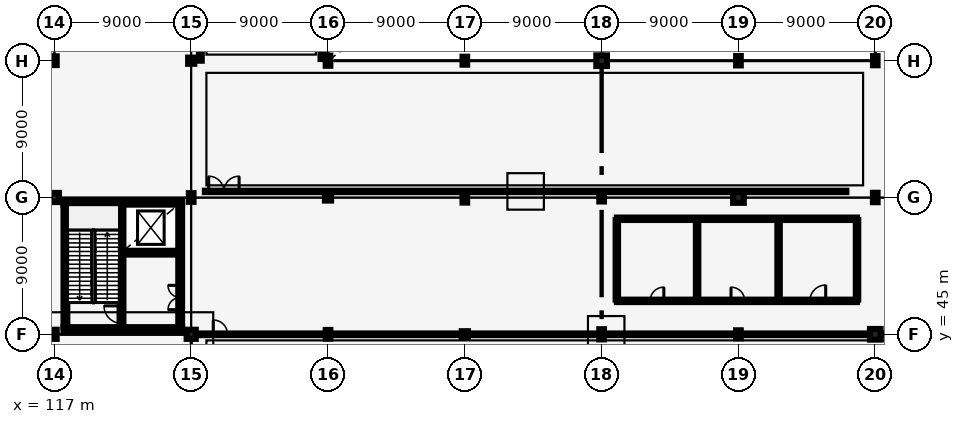
"""IFC4 building model, lengths in metres.
Left out: names, types, materials, properties, quantities, classifications, styles, units other than length and angle.
Written with IfcOpenShell. Run it as: python <this file> out.ifc"""

import sys

from ifc_helpers import new_model, si_unit, direction, frame, frame_2d, origin, origin_2d, place, context, subcontext, project, spatial, rectangle, hollow_circle, i_section, extrude, element, fill, save


model = new_model("IFC4")
c1 = context("Model", 3, precision=1e-05, world=origin(), true_north=direction((0.0, 1.0)))
c2 = subcontext(c1, "Body", "Model", "MODEL_VIEW")
j1 = project(units=[si_unit("LENGTHUNIT", "METRE"), si_unit("PLANEANGLEUNIT", "RADIAN")], contexts=[c1])
p1 = place(None, origin())
s1 = spatial("IfcSite", under=j1, at=p1, CompositionType="ELEMENT")
p2 = place(p1, origin())
s2 = spatial("IfcBuilding", under=s1, at=p2, CompositionType="ELEMENT")
p3 = place(p2, frame((0.0, 0.0, 6.0)))
s3 = spatial("IfcBuildingStorey", under=s2, at=p3, CompositionType="ELEMENT", Elevation=6.0)
p4 = place(p3, frame((117.0, 45.0, 0.0), z_axis=(0.0, 0.0, 1.0), x_axis=(1.0, 0.0, 0.0)))
e1 = element("IfcColumn", 1, at=p4, inside=s3, PredefinedType="COLUMN", context=c2, shape_type="SweptSolid", body=[
    extrude(i_section(OverallWidth=0.3, OverallDepth=0.6, WebThickness=0.015, FlangeThickness=0.03, FilletRadius=0.027, at=origin_2d()), origin(), (0.0, 0.0, 1.0), 6.0),
])
p5 = place(p3, frame((117.0, 54.0, 0.0), z_axis=(0.0, 0.0, 1.0), x_axis=(1.0, 0.0, 0.0)))
e2 = element("IfcColumn", 2, at=p5, inside=s3, PredefinedType="COLUMN", context=c2, shape_type="SweptSolid", body=[
    extrude(rectangle(XDim=0.6, YDim=0.6, at=origin_2d()), origin(), (0.0, 0.0, 1.0), 6.0),
])
p6 = place(p3, frame((117.0, 63.0, 0.0), z_axis=(0.0, 0.0, 1.0), x_axis=(1.0, 0.0, 0.0)))
e3 = element("IfcColumn", 3, at=p6, inside=s3, PredefinedType="COLUMN", context=c2, shape_type="SweptSolid", body=[
    extrude(i_section(OverallWidth=0.306, OverallDepth=0.572, WebThickness=0.021, FlangeThickness=0.04, FilletRadius=0.027, at=origin_2d()), origin(), (0.0, 0.0, 1.0), 6.0),
])
p7 = place(p3, frame((126.0, 45.0, 0.0), z_axis=(0.0, 0.0, 1.0), x_axis=(1.0, 0.0, 0.0)))
e4 = element("IfcColumn", 4, at=p7, inside=s3, PredefinedType="COLUMN", context=c2, shape_type="SweptSolid", body=[
    extrude(rectangle(XDim=0.6, YDim=0.6, at=origin_2d()), origin(), (0.0, 0.0, 1.0), 6.0),
])
p8 = place(p3, frame((126.0, 54.0, 0.0), z_axis=(0.0, 0.0, 1.0), x_axis=(1.0, 0.0, 0.0)))
e5 = element("IfcColumn", 5, at=p8, inside=s3, PredefinedType="COLUMN", context=c2, shape_type="SweptSolid", body=[
    extrude(i_section(OverallWidth=0.306, OverallDepth=0.572, WebThickness=0.021, FlangeThickness=0.04, FilletRadius=0.027, at=origin_2d()), origin(), (0.0, 0.0, 1.0), 6.0),
])
p9 = place(p3, frame((126.0, 63.0, 0.0), z_axis=(0.0, 0.0, 1.0), x_axis=(1.0, 0.0, 0.0)))
e6 = element("IfcColumn", 6, at=p9, inside=s3, PredefinedType="COLUMN", context=c2, shape_type="SweptSolid", body=[
    extrude(hollow_circle(Radius=0.203, WallThickness=0.016, at=origin_2d()), origin(), (0.0, 0.0, 1.0), 6.0),
])
p10 = place(p3, frame((135.0, 45.0, 0.0), z_axis=(0.0, 0.0, 1.0), x_axis=(1.0, 0.0, 0.0)))
e7 = element("IfcColumn", 7, at=p10, inside=s3, PredefinedType="COLUMN", context=c2, shape_type="SweptSolid", body=[
    extrude(i_section(OverallWidth=0.306, OverallDepth=0.572, WebThickness=0.021, FlangeThickness=0.04, FilletRadius=0.027, at=origin_2d()), origin(), (0.0, 0.0, 1.0), 6.0),
])
p11 = place(p3, frame((135.0, 54.0, 0.0), z_axis=(0.0, 0.0, 1.0), x_axis=(1.0, 0.0, 0.0)))
e8 = element("IfcColumn", 8, at=p11, inside=s3, PredefinedType="COLUMN", context=c2, shape_type="SweptSolid", body=[
    extrude(hollow_circle(Radius=0.203, WallThickness=0.016, at=origin_2d()), origin(), (0.0, 0.0, 1.0), 6.0),
])
p12 = place(p3, frame((135.0, 63.0, 0.0), z_axis=(0.0, 0.0, 1.0), x_axis=(1.0, 0.0, 0.0)))
e9 = element("IfcColumn", 9, at=p12, inside=s3, PredefinedType="COLUMN", context=c2, shape_type="SweptSolid", body=[
    extrude(i_section(OverallWidth=0.305, OverallDepth=0.668, WebThickness=0.021, FlangeThickness=0.04, FilletRadius=0.027, at=origin_2d()), origin(), (0.0, 0.0, 1.0), 6.0),
])
p13 = place(p3, frame((144.0, 45.0, 0.0), z_axis=(0.0, 0.0, 1.0), x_axis=(1.0, 0.0, 0.0)))
e10 = element("IfcColumn", 10, at=p13, inside=s3, PredefinedType="COLUMN", context=c2, shape_type="SweptSolid", body=[
    extrude(hollow_circle(Radius=0.203, WallThickness=0.016, at=origin_2d()), origin(), (0.0, 0.0, 1.0), 6.0),
])
p14 = place(p3, frame((144.0, 54.0, 0.0), z_axis=(0.0, 0.0, 1.0), x_axis=(1.0, 0.0, 0.0)))
e11 = element("IfcColumn", 11, at=p14, inside=s3, PredefinedType="COLUMN", context=c2, shape_type="SweptSolid", body=[
    extrude(i_section(OverallWidth=0.305, OverallDepth=0.668, WebThickness=0.021, FlangeThickness=0.04, FilletRadius=0.027, at=origin_2d()), origin(), (0.0, 0.0, 1.0), 6.0),
])
p15 = place(p3, frame((144.0, 63.0, 0.0), z_axis=(0.0, 0.0, 1.0), x_axis=(1.0, 0.0, 0.0)))
e12 = element("IfcColumn", 12, at=p15, inside=s3, PredefinedType="COLUMN", context=c2, shape_type="SweptSolid", body=[
    extrude(i_section(OverallWidth=0.306, OverallDepth=0.524, WebThickness=0.021, FlangeThickness=0.04, FilletRadius=0.027, at=origin_2d()), origin(), (0.0, 0.0, 1.0), 6.0),
])
p16 = place(p3, frame((153.0, 45.0, 0.0), z_axis=(0.0, 0.0, 1.0), x_axis=(1.0, 0.0, 0.0)))
e13 = element("IfcColumn", 13, at=p16, inside=s3, PredefinedType="COLUMN", context=c2, shape_type="SweptSolid", body=[
    extrude(i_section(OverallWidth=0.305, OverallDepth=0.668, WebThickness=0.021, FlangeThickness=0.04, FilletRadius=0.027, at=origin_2d()), origin(), (0.0, 0.0, 1.0), 6.0),
])
p17 = place(p3, frame((153.0, 54.0, 0.0), z_axis=(0.0, 0.0, 1.0), x_axis=(1.0, 0.0, 0.0)))
e14 = element("IfcColumn", 14, at=p17, inside=s3, PredefinedType="COLUMN", context=c2, shape_type="SweptSolid", body=[
    extrude(i_section(OverallWidth=0.306, OverallDepth=0.524, WebThickness=0.021, FlangeThickness=0.04, FilletRadius=0.027, at=origin_2d()), origin(), (0.0, 0.0, 1.0), 6.0),
])
p18 = place(p3, frame((153.0, 63.0, 0.0), z_axis=(0.0, 0.0, 1.0), x_axis=(1.0, 0.0, 0.0)))
e15 = element("IfcColumn", 15, at=p18, inside=s3, PredefinedType="COLUMN", context=c2, shape_type="SweptSolid", body=[
    extrude(rectangle(XDim=0.7, YDim=0.7, at=origin_2d()), origin(), (0.0, 0.0, 1.0), 6.0),
])
p19 = place(p3, frame((162.0, 45.0, 0.0), z_axis=(0.0, 0.0, 1.0), x_axis=(1.0, 0.0, 0.0)))
e16 = element("IfcColumn", 16, at=p19, inside=s3, PredefinedType="COLUMN", context=c2, shape_type="SweptSolid", body=[
    extrude(i_section(OverallWidth=0.306, OverallDepth=0.524, WebThickness=0.021, FlangeThickness=0.04, FilletRadius=0.027, at=origin_2d()), origin(), (0.0, 0.0, 1.0), 6.0),
])
p20 = place(p3, frame((162.0, 54.0, 0.0), z_axis=(0.0, 0.0, 1.0), x_axis=(1.0, 0.0, 0.0)))
e17 = element("IfcColumn", 17, at=p20, inside=s3, PredefinedType="COLUMN", context=c2, shape_type="SweptSolid", body=[
    extrude(rectangle(XDim=0.7, YDim=0.7, at=origin_2d()), origin(), (0.0, 0.0, 1.0), 6.0),
])
p21 = place(p3, frame((162.0, 63.0, 0.0), z_axis=(0.0, 0.0, 1.0), x_axis=(1.0, 0.0, 0.0)))
e18 = element("IfcColumn", 18, at=p21, inside=s3, PredefinedType="COLUMN", context=c2, shape_type="SweptSolid", body=[
    extrude(i_section(OverallWidth=0.305, OverallDepth=0.62, WebThickness=0.021, FlangeThickness=0.04, FilletRadius=0.027, at=origin_2d()), origin(), (0.0, 0.0, 1.0), 6.0),
])
p22 = place(p3, frame((171.0, 45.0, 0.0), z_axis=(0.0, 0.0, 1.0), x_axis=(1.0, 0.0, 0.0)))
e19 = element("IfcColumn", 19, at=p22, inside=s3, PredefinedType="COLUMN", context=c2, shape_type="SweptSolid", body=[
    extrude(rectangle(XDim=0.7, YDim=0.7, at=origin_2d()), origin(), (0.0, 0.0, 1.0), 6.0),
])
p23 = place(p3, frame((171.0, 54.0, 0.0), z_axis=(0.0, 0.0, 1.0), x_axis=(1.0, 0.0, 0.0)))
e20 = element("IfcColumn", 20, at=p23, inside=s3, PredefinedType="COLUMN", context=c2, shape_type="SweptSolid", body=[
    extrude(i_section(OverallWidth=0.305, OverallDepth=0.62, WebThickness=0.021, FlangeThickness=0.04, FilletRadius=0.027, at=origin_2d()), origin(), (0.0, 0.0, 1.0), 6.0),
])
p24 = place(p3, frame((171.0, 63.0, 0.0), z_axis=(0.0, 0.0, 1.0), x_axis=(1.0, 0.0, 0.0)))
e21 = element("IfcColumn", 21, at=p24, inside=s3, PredefinedType="COLUMN", context=c2, shape_type="SweptSolid", body=[
    extrude(i_section(OverallWidth=0.3, OverallDepth=0.6, WebThickness=0.015, FlangeThickness=0.03, FilletRadius=0.027, at=origin_2d()), origin(), (0.0, 0.0, 1.0), 6.0),
])
p25 = place(p3, frame((117.725, 45.47, 0.0), z_axis=(0.0, 0.0, 1.0), x_axis=(0.0, 1.0, 0.0)))
e22 = element("IfcWall", 22, at=p25, inside=s3, PredefinedType="SHEAR", context=c2, shape_type="SweptSolid", body=[
    extrude(rectangle(XDim=8.06, YDim=0.25, at=frame_2d((4.03, 0.0))), origin(), (0.0, 0.0, 1.0), 5.71),
])
p26 = place(p3, frame((125.275, 45.47, 0.0), z_axis=(0.0, 0.0, 1.0), x_axis=(0.0, 1.0, 0.0)))
e23 = element("IfcWall", 23, at=p26, inside=s3, PredefinedType="SHEAR", context=c2, shape_type="SweptSolid", body=[
    extrude(rectangle(XDim=8.06, YDim=0.25, at=frame_2d((4.03, 0.0))), origin(), (0.0, 0.0, 1.0), 5.71),
])
p27 = place(p26, frame((1.15, 0.0, 0.0)))
e24 = element("IfcOpeningElement", 24, at=p27, cuts=e23, PredefinedType="OPENING", context=c2, shape_type="SweptSolid", body=[
    extrude(rectangle(XDim=1.6, YDim=2.2, at=frame_2d((0.8, 1.1))), frame((0.0, 0.135, 0.0), z_axis=(0.0, -1.0, 0.0), x_axis=(1.0, 0.0, 0.0)), (0.0, 0.0, 1.0), 0.27),
])
for number, where, z_axis, x_axis in (
    (25, (117.6, 45.345, 0.0), (0.0, 0.0, 1.0), (1.0, 0.0, 0.0)),
    (26, (117.6, 53.655, 0.0), (0.0, 0.0, 1.0), (1.0, 0.0, 0.0)),
):
    element("IfcWall", number, at=place(p3, frame(where, z_axis=z_axis, x_axis=x_axis)), inside=s3, PredefinedType="SHEAR", context=c2, shape_type="SweptSolid", body=[
        extrude(rectangle(XDim=7.8, YDim=0.25, at=frame_2d((3.9, 0.0))), origin(), (0.0, 0.0, 1.0), 5.71),
    ])
p28 = place(p3, frame((121.415, 45.47, 0.0), z_axis=(0.0, 0.0, 1.0), x_axis=(0.0, 1.0, 0.0)))
e27 = element("IfcWall", 27, at=p28, inside=s3, PredefinedType="SHEAR", context=c2, shape_type="SweptSolid", body=[
    extrude(rectangle(XDim=8.06, YDim=0.25, at=frame_2d((4.03, 0.0))), origin(), (0.0, 0.0, 1.0), 5.71),
])
p29 = place(p28, frame((0.25, 0.0, 0.0)))
e28 = element("IfcOpeningElement", 28, at=p29, cuts=e27, PredefinedType="OPENING", context=c2, shape_type="SweptSolid", body=[
    extrude(rectangle(XDim=1.15, YDim=2.15, at=frame_2d((0.575, 1.075))), frame((0.0, 0.135, 0.0), z_axis=(0.0, -1.0, 0.0), x_axis=(1.0, 0.0, 0.0)), (0.0, 0.0, 1.0), 0.27),
])
p30 = place(p3, frame((121.54, 50.37, 0.0), z_axis=(0.0, 0.0, 1.0), x_axis=(1.0, 0.0, 0.0)))
e29 = element("IfcWall", 29, at=p30, inside=s3, PredefinedType="SHEAR", context=c2, shape_type="SweptSolid", body=[
    extrude(rectangle(XDim=3.61, YDim=0.25, at=frame_2d((1.805, 0.0))), origin(), (0.0, 0.0, 1.0), 5.71),
])
p31 = place(p30, frame((0.95, 0.0, 0.0)))
e30 = element("IfcOpeningElement", 30, at=p31, cuts=e29, PredefinedType="OPENING", context=c2, shape_type="SweptSolid", body=[
    extrude(rectangle(XDim=1.2, YDim=2.2, at=frame_2d((0.6, 1.1))), frame((0.0, 0.135, 0.0), z_axis=(0.0, -1.0, 0.0), x_axis=(1.0, 0.0, 0.0)), (0.0, 0.0, 1.0), 0.27),
])
p32 = place(p3, frame((154.0, 47.2, 0.0), z_axis=(0.0, 0.0, 1.0), x_axis=(1.0, 0.0, 0.0)))
e31 = element("IfcWall", 31, at=p32, inside=s3, PredefinedType="PLUMBINGWALL", context=c2, shape_type="SweptSolid", body=[
    extrude(rectangle(XDim=15.8, YDim=0.16, at=frame_2d((7.9, 0.0))), origin(), (0.0, 0.0, 1.0), 4.85),
])
p33 = place(p32, frame((2.19, 0.0, 0.0)))
e32 = element("IfcOpeningElement", 32, at=p33, cuts=e31, PredefinedType="OPENING", context=c2, shape_type="SweptSolid", body=[
    extrude(rectangle(XDim=0.9, YDim=2.1, at=frame_2d((0.45, 1.05))), frame((0.0, 0.09, 0.0), z_axis=(0.0, -1.0, 0.0), x_axis=(1.0, 0.0, 0.0)), (0.0, 0.0, 1.0), 0.18),
])
p34 = place(p32, frame((7.51, 0.0, 0.0)))
e33 = element("IfcOpeningElement", 33, at=p34, cuts=e31, PredefinedType="OPENING", context=c2, shape_type="SweptSolid", body=[
    extrude(rectangle(XDim=0.9, YDim=2.1, at=frame_2d((0.45, 1.05))), frame((0.0, 0.09, 0.0), z_axis=(0.0, -1.0, 0.0), x_axis=(1.0, 0.0, 0.0)), (0.0, 0.0, 1.0), 0.18),
])
p35 = place(p32, frame((12.7, 0.0, 0.0)))
e34 = element("IfcOpeningElement", 34, at=p35, cuts=e31, PredefinedType="OPENING", context=c2, shape_type="SweptSolid", body=[
    extrude(rectangle(XDim=1.04, YDim=2.15, at=frame_2d((0.52, 1.075))), frame((0.0, 0.09, 0.0), z_axis=(0.0, -1.0, 0.0), x_axis=(1.0, 0.0, 0.0)), (0.0, 0.0, 1.0), 0.18),
])
p36 = place(p3, frame((154.0, 52.6, 0.0), z_axis=(0.0, 0.0, 1.0), x_axis=(1.0, 0.0, 0.0)))
e35 = element("IfcWall", 35, at=p36, inside=s3, PredefinedType="PLUMBINGWALL", context=c2, shape_type="SweptSolid", body=[
    extrude(rectangle(XDim=15.8, YDim=0.16, at=frame_2d((7.9, 0.0))), origin(), (0.0, 0.0, 1.0), 4.85),
])
for number, where, z_axis, x_axis in (
    (36, (154.0, 47.288, 0.0), (0.0, 0.0, 1.0), (0.0, 1.0, 0.0)),
    (37, (159.28, 47.288, 0.0), (0.0, 0.0, 1.0), (0.0, 1.0, 0.0)),
    (38, (164.64, 47.288, 0.0), (0.0, 0.0, 1.0), (0.0, 1.0, 0.0)),
    (39, (169.8, 47.288, 0.0), (0.0, 0.0, 1.0), (0.0, 1.0, 0.0)),
):
    element("IfcWall", number, at=place(p3, frame(where, z_axis=z_axis, x_axis=x_axis)), inside=s3, PredefinedType="PLUMBINGWALL", context=c2, shape_type="SweptSolid", body=[
        extrude(rectangle(XDim=5.224, YDim=0.16, at=frame_2d((2.612, 0.0))), origin(), (0.0, 0.0, 1.0), 4.85),
    ])
p37 = place(p3, frame((126.6, 45.0, 0.0), z_axis=(0.0, 0.0, 1.0), x_axis=(1.0, 0.0, 0.0)))
e40 = element("IfcWall", 40, at=p37, inside=s3, PredefinedType="PARTITIONING", context=c2, shape_type="SweptSolid", body=[
    extrude(rectangle(XDim=53.4, YDim=0.11, at=frame_2d((26.7, 0.0))), origin(), (0.0, 0.0, 1.0), 4.85),
])
p38 = place(p37, frame((0.85, 0.0, 0.0)))
e41 = element("IfcOpeningElement", 41, at=p38, cuts=e40, PredefinedType="OPENING", context=c2, shape_type="SweptSolid", body=[
    extrude(rectangle(XDim=0.94, YDim=2.1, at=frame_2d((0.47, 1.05))), frame((0.0, 0.065, 0.0), z_axis=(0.0, -1.0, 0.0), x_axis=(1.0, 0.0, 0.0)), (0.0, 0.0, 1.0), 0.13),
])
p39 = place(p3, frame((126.9, 54.4, 0.0), z_axis=(0.0, 0.0, 1.0), x_axis=(1.0, 0.0, 0.0)))
e42 = element("IfcWall", 42, at=p39, inside=s3, PredefinedType="PARTITIONING", context=c2, shape_type="SweptSolid", body=[
    extrude(rectangle(XDim=42.2, YDim=0.095, at=frame_2d((21.1, 0.0))), origin(), (0.0, 0.0, 1.0), 4.85),
])
p40 = place(p39, frame((0.25, 0.0, 0.0)))
e43 = element("IfcOpeningElement", 43, at=p40, cuts=e42, PredefinedType="OPENING", context=c2, shape_type="SweptSolid", body=[
    extrude(rectangle(XDim=2.0, YDim=2.45, at=frame_2d((1.0, 1.225))), frame((0.0, 0.057, 0.0), z_axis=(0.0, -1.0, 0.0), x_axis=(1.0, 0.0, 0.0)), (0.0, 0.0, 1.0), 0.115),
])
p41 = place(p3, frame((126.6, 63.0, 0.0), z_axis=(0.0, 0.0, 1.0), x_axis=(0.0, 1.0, 0.0)))
e44 = element("IfcWall", 44, at=p41, inside=s3, PredefinedType="PARTITIONING", context=c2, shape_type="SweptSolid", body=[
    extrude(rectangle(XDim=17.8, YDim=0.185, at=frame_2d((8.9, 0.0))), origin(), (0.0, 0.0, 1.0), 4.85),
])
p42 = place(p41, frame((0.85, 0.0, 0.0)))
e45 = element("IfcOpeningElement", 45, at=p42, cuts=e44, PredefinedType="OPENING", context=c2, shape_type="SweptSolid", body=[
    extrude(rectangle(XDim=1.9, YDim=2.4, at=frame_2d((0.95, 1.2))), frame((0.0, 0.103, 0.0), z_axis=(0.0, -1.0, 0.0), x_axis=(1.0, 0.0, 0.0)), (0.0, 0.0, 1.0), 0.205),
])
p43 = place(p3, frame((134.6, 63.111, 0.0), z_axis=(0.0, 0.0, 1.0), x_axis=(0.0, 1.0, 0.0)))
e46 = element("IfcWall", 46, at=p43, inside=s3, PredefinedType="PARTITIONING", context=c2, shape_type="SweptSolid", body=[
    extrude(rectangle(XDim=17.578, YDim=0.185, at=frame_2d((8.789, 0.0))), origin(), (0.0, 0.0, 1.0), 4.85),
])
p44 = place(p29, origin())
e47 = element("IfcDoor", 47, at=p44, inside=s3, OperationType="SINGLE_SWING_RIGHT", PredefinedType="DOOR", context=c2, shape_type="SweptSolid", body=[
    extrude(rectangle(XDim=1.15, YDim=2.15, at=frame_2d((0.575, 1.075))), frame((0.0, 0.025, 0.0), z_axis=(0.0, -1.0, 0.0), x_axis=(1.0, 0.0, 0.0)), (0.0, 0.0, 1.0), 0.05),
])
fill(e28, e47)
p45 = place(p31, origin())
e48 = element("IfcDoor", 48, at=p45, inside=s3, OperationType="DOUBLE_DOOR_SLIDING", PredefinedType="DOOR", context=c2, shape_type="SweptSolid", body=[
    extrude(rectangle(XDim=1.2, YDim=2.2, at=frame_2d((0.6, 1.1))), frame((0.0, 0.025, 0.0), z_axis=(0.0, -1.0, 0.0), x_axis=(1.0, 0.0, 0.0)), (0.0, 0.0, 1.0), 0.05),
])
fill(e30, e48)
p46 = place(p27, origin())
e49 = element("IfcDoor", 49, at=p46, inside=s3, OperationType="DOUBLE_DOOR_SINGLE_SWING", PredefinedType="DOOR", context=c2, shape_type="SweptSolid", body=[
    extrude(rectangle(XDim=1.6, YDim=2.2, at=frame_2d((0.8, 1.1))), frame((0.0, 0.025, 0.0), z_axis=(0.0, -1.0, 0.0), x_axis=(1.0, 0.0, 0.0)), (0.0, 0.0, 1.0), 0.05),
])
fill(e24, e49)
p47 = place(p33, origin())
e50 = element("IfcDoor", 50, at=p47, inside=s3, OperationType="SINGLE_SWING_RIGHT", PredefinedType="DOOR", context=c2, shape_type="SweptSolid", body=[
    extrude(rectangle(XDim=0.9, YDim=2.1, at=frame_2d((0.45, 1.05))), frame((0.0, 0.025, 0.0), z_axis=(0.0, -1.0, 0.0), x_axis=(1.0, 0.0, 0.0)), (0.0, 0.0, 1.0), 0.05),
])
fill(e32, e50)
p48 = place(p34, origin())
e51 = element("IfcDoor", 51, at=p48, inside=s3, OperationType="SINGLE_SWING_LEFT", PredefinedType="DOOR", context=c2, shape_type="SweptSolid", body=[
    extrude(rectangle(XDim=0.9, YDim=2.1, at=frame_2d((0.45, 1.05))), frame((0.0, 0.025, 0.0), z_axis=(0.0, -1.0, 0.0), x_axis=(1.0, 0.0, 0.0)), (0.0, 0.0, 1.0), 0.05),
])
fill(e33, e51)
p49 = place(p35, origin())
e52 = element("IfcDoor", 52, at=p49, inside=s3, OperationType="SINGLE_SWING_RIGHT", PredefinedType="DOOR", context=c2, shape_type="SweptSolid", body=[
    extrude(rectangle(XDim=1.04, YDim=2.15, at=frame_2d((0.52, 1.075))), frame((0.0, 0.025, 0.0), z_axis=(0.0, -1.0, 0.0), x_axis=(1.0, 0.0, 0.0)), (0.0, 0.0, 1.0), 0.05),
])
fill(e34, e52)
p50 = place(p38, origin())
e53 = element("IfcDoor", 53, at=p50, inside=s3, OperationType="SINGLE_SWING_LEFT", PredefinedType="DOOR", context=c2, shape_type="SweptSolid", body=[
    extrude(rectangle(XDim=0.94, YDim=2.1, at=frame_2d((0.47, 1.05))), frame((0.0, 0.025, 0.0), z_axis=(0.0, -1.0, 0.0), x_axis=(1.0, 0.0, 0.0)), (0.0, 0.0, 1.0), 0.05),
])
fill(e41, e53)
p51 = place(p40, origin())
e54 = element("IfcDoor", 54, at=p51, inside=s3, OperationType="DOUBLE_DOOR_SINGLE_SWING", PredefinedType="DOOR", context=c2, shape_type="SweptSolid", body=[
    extrude(rectangle(XDim=2.0, YDim=2.45, at=frame_2d((1.0, 1.225))), frame((0.0, 0.025, 0.0), z_axis=(0.0, -1.0, 0.0), x_axis=(1.0, 0.0, 0.0)), (0.0, 0.0, 1.0), 0.05),
])
fill(e43, e54)
save(model, sys.argv[1])
